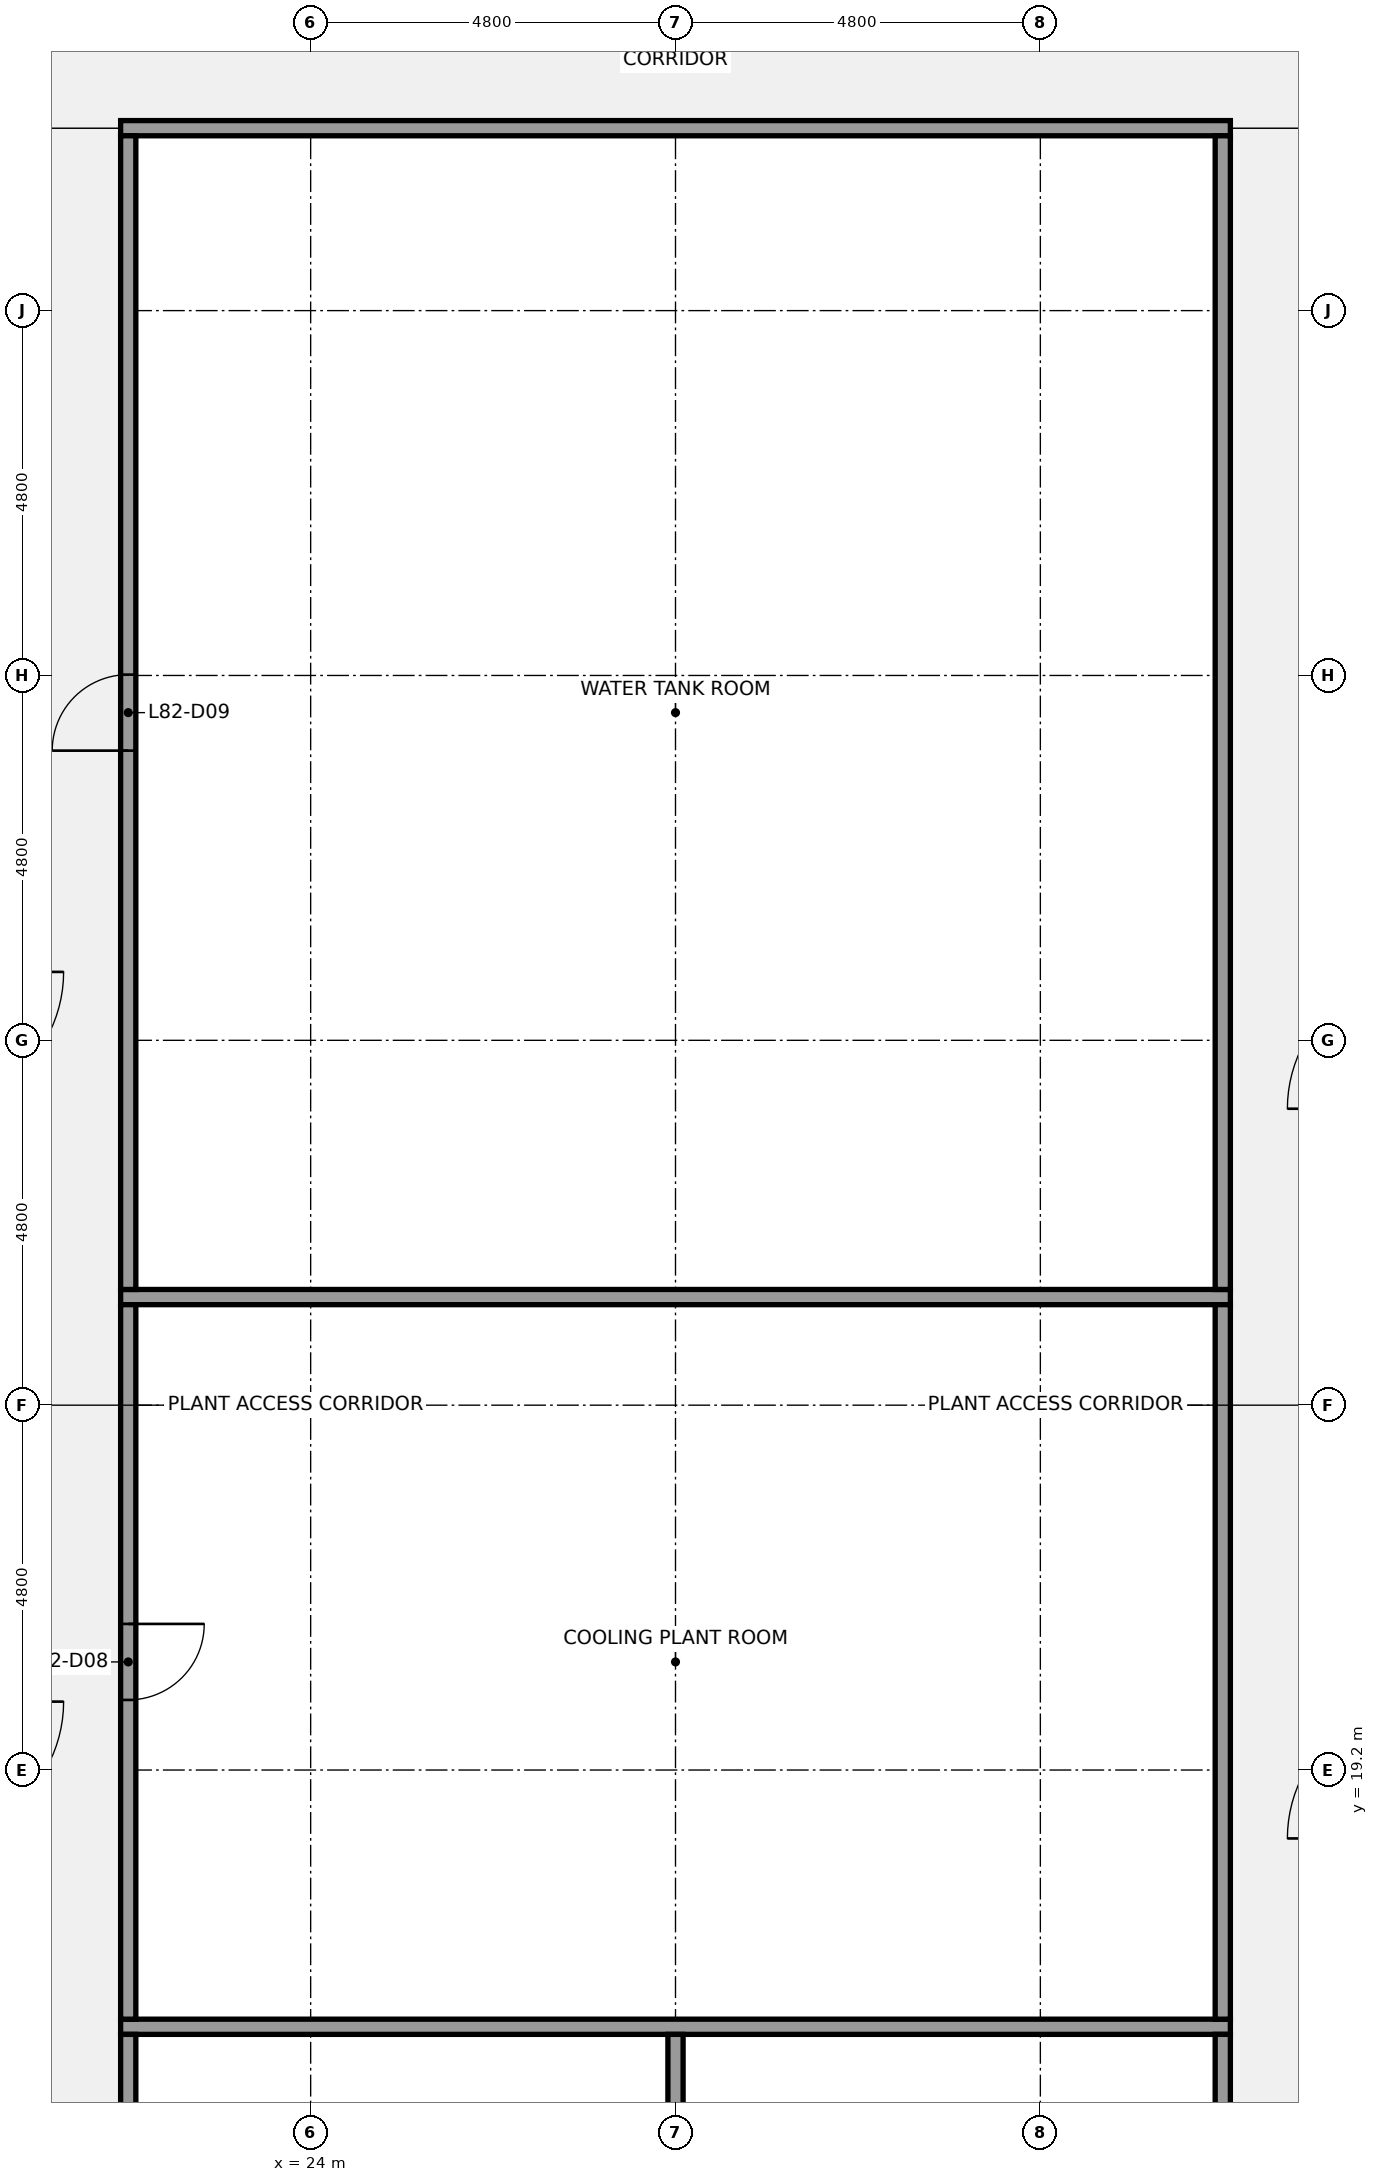
"""IFC4 building model, lengths in metres.
Left out: names, types, materials, properties, quantities, classifications, styles, units other than length and angle.
Written with IfcOpenShell. Run it as: python <this file> out.ifc"""

import sys

from ifc_helpers import new_model, si_unit, direction, frame, frame_2d, origin, place, context, subcontext, project, spatial, rectangle, extrude, element, fill, save


model = new_model("IFC4")
c1 = context("Model", 3, precision=1e-05, world=origin(), true_north=direction((0.0, 1.0)))
c2 = subcontext(c1, "Body", "Model", "MODEL_VIEW")
j1 = project(units=[si_unit("LENGTHUNIT", "METRE"), si_unit("PLANEANGLEUNIT", "RADIAN")], contexts=[c1])
p1 = place(None, origin())
s1 = spatial("IfcSite", under=j1, at=p1, CompositionType="ELEMENT")
p2 = place(p1, origin())
s2 = spatial("IfcBuilding", under=s1, at=p2, CompositionType="ELEMENT")
p3 = place(p2, frame((0.0, 0.0, 366.3)))
s3 = spatial("IfcBuildingStorey", under=s2, at=p3, CompositionType="ELEMENT", Elevation=366.3)
for number, where, z_axis, x_axis in (
    (1, (21.5, 15.822, 0.0), (0.0, 0.0, 1.0), (1.0, 0.0, 0.0)),
    (2, (21.5, 25.422, 0.0), (0.0, 0.0, 1.0), (1.0, 0.0, 0.0)),
    (3, (21.5, 40.8, 0.0), (0.0, 0.0, 1.0), (1.0, 0.0, 0.0)),
):
    element("IfcWall", number, at=place(p3, frame(where, z_axis=z_axis, x_axis=x_axis)), inside=s3, PredefinedType="PARTITIONING", context=c2, shape_type="SweptSolid", body=[
        extrude(rectangle(XDim=14.6, YDim=0.2, at=frame_2d((7.3, 0.0))), origin(), (0.0, 0.0, 1.0), 2.759),
    ])
p4 = place(p3, frame((21.6, 7.3, 0.0), z_axis=(0.0, 0.0, 1.0), x_axis=(0.0, 1.0, 0.0)))
e4 = element("IfcWall", 4, at=p4, inside=s3, PredefinedType="PARTITIONING", context=c2, shape_type="SweptSolid", body=[
    extrude(rectangle(XDim=8.422, YDim=0.2, at=frame_2d((4.211, 0.0))), origin(), (0.0, 0.0, 1.0), 2.759),
])
p5 = place(p3, frame((21.6, 15.922, 0.0), z_axis=(0.0, 0.0, 1.0), x_axis=(0.0, 1.0, 0.0)))
e5 = element("IfcWall", 5, at=p5, inside=s3, PredefinedType="PARTITIONING", context=c2, shape_type="SweptSolid", body=[
    extrude(rectangle(XDim=9.4, YDim=0.2, at=frame_2d((4.7, 0.0))), origin(), (0.0, 0.0, 1.0), 2.759),
])
p6 = place(p5, frame((4.2, 0.0, 0.0)))
e6 = element("IfcOpeningElement", 6, at=p6, cuts=e5, PredefinedType="OPENING", context=c2, shape_type="SweptSolid", body=[
    extrude(rectangle(XDim=1.0, YDim=2.1, at=frame_2d((0.5, 1.05))), frame((0.0, 0.11, 0.0), z_axis=(0.0, -1.0, 0.0), x_axis=(1.0, 0.0, 0.0)), (0.0, 0.0, 1.0), 0.22),
])
p7 = place(p3, frame((21.6, 25.522, 0.0), z_axis=(0.0, 0.0, 1.0), x_axis=(0.0, 1.0, 0.0)))
e7 = element("IfcWall", 7, at=p7, inside=s3, PredefinedType="PARTITIONING", context=c2, shape_type="SweptSolid", body=[
    extrude(rectangle(XDim=15.178, YDim=0.2, at=frame_2d((7.589, 0.0))), origin(), (0.0, 0.0, 1.0), 2.759),
])
p8 = place(p7, frame((7.089, 0.0, 0.0)))
e8 = element("IfcOpeningElement", 8, at=p8, cuts=e7, PredefinedType="OPENING", context=c2, shape_type="SweptSolid", body=[
    extrude(rectangle(XDim=1.0, YDim=2.1, at=frame_2d((0.5, 1.05))), frame((0.0, 0.11, 0.0), z_axis=(0.0, -1.0, 0.0), x_axis=(1.0, 0.0, 0.0)), (0.0, 0.0, 1.0), 0.22),
])
p9 = place(p3, frame((28.8, 6.322, 0.0), z_axis=(0.0, 0.0, 1.0), x_axis=(0.0, 1.0, 0.0)))
e9 = element("IfcWall", 9, at=p9, inside=s3, PredefinedType="PARTITIONING", context=c2, shape_type="SweptSolid", body=[
    extrude(rectangle(XDim=9.4, YDim=0.2, at=frame_2d((4.7, 0.0))), origin(), (0.0, 0.0, 1.0), 2.759),
])
p10 = place(p3, frame((36.0, 7.3, 0.0), z_axis=(0.0, 0.0, 1.0), x_axis=(0.0, 1.0, 0.0)))
e10 = element("IfcWall", 10, at=p10, inside=s3, PredefinedType="PARTITIONING", context=c2, shape_type="SweptSolid", body=[
    extrude(rectangle(XDim=8.422, YDim=0.2, at=frame_2d((4.211, 0.0))), origin(), (0.0, 0.0, 1.0), 2.759),
])
p11 = place(p3, frame((36.0, 15.922, 0.0), z_axis=(0.0, 0.0, 1.0), x_axis=(0.0, 1.0, 0.0)))
e11 = element("IfcWall", 11, at=p11, inside=s3, PredefinedType="PARTITIONING", context=c2, shape_type="SweptSolid", body=[
    extrude(rectangle(XDim=9.4, YDim=0.2, at=frame_2d((4.7, 0.0))), origin(), (0.0, 0.0, 1.0), 2.759),
])
p12 = place(p3, frame((36.0, 25.522, 0.0), z_axis=(0.0, 0.0, 1.0), x_axis=(0.0, 1.0, 0.0)))
e12 = element("IfcWall", 12, at=p12, inside=s3, PredefinedType="PARTITIONING", context=c2, shape_type="SweptSolid", body=[
    extrude(rectangle(XDim=15.178, YDim=0.2, at=frame_2d((7.589, 0.0))), origin(), (0.0, 0.0, 1.0), 2.759),
])
p13 = place(p6, origin())
e13 = element("IfcDoor", 13, at=p13, inside=s3, OperationType="SINGLE_SWING_RIGHT", PredefinedType="DOOR", context=c2, shape_type="SweptSolid", body=[
    extrude(rectangle(XDim=1.0, YDim=2.1, at=frame_2d((0.5, 1.05))), frame((0.0, 0.025, 0.0), z_axis=(0.0, -1.0, 0.0), x_axis=(1.0, 0.0, 0.0)), (0.0, 0.0, 1.0), 0.05),
])
fill(e6, e13)
p14 = place(p8, origin())
e14 = element("IfcDoor", 14, at=p14, inside=s3, OperationType="SINGLE_SWING_LEFT", PredefinedType="DOOR", context=c2, shape_type="SweptSolid", body=[
    extrude(rectangle(XDim=1.0, YDim=2.1, at=frame_2d((0.5, 1.05))), frame((0.0, 0.025, 0.0), z_axis=(0.0, -1.0, 0.0), x_axis=(1.0, 0.0, 0.0)), (0.0, 0.0, 1.0), 0.05),
])
fill(e8, e14)
save(model, sys.argv[1])
